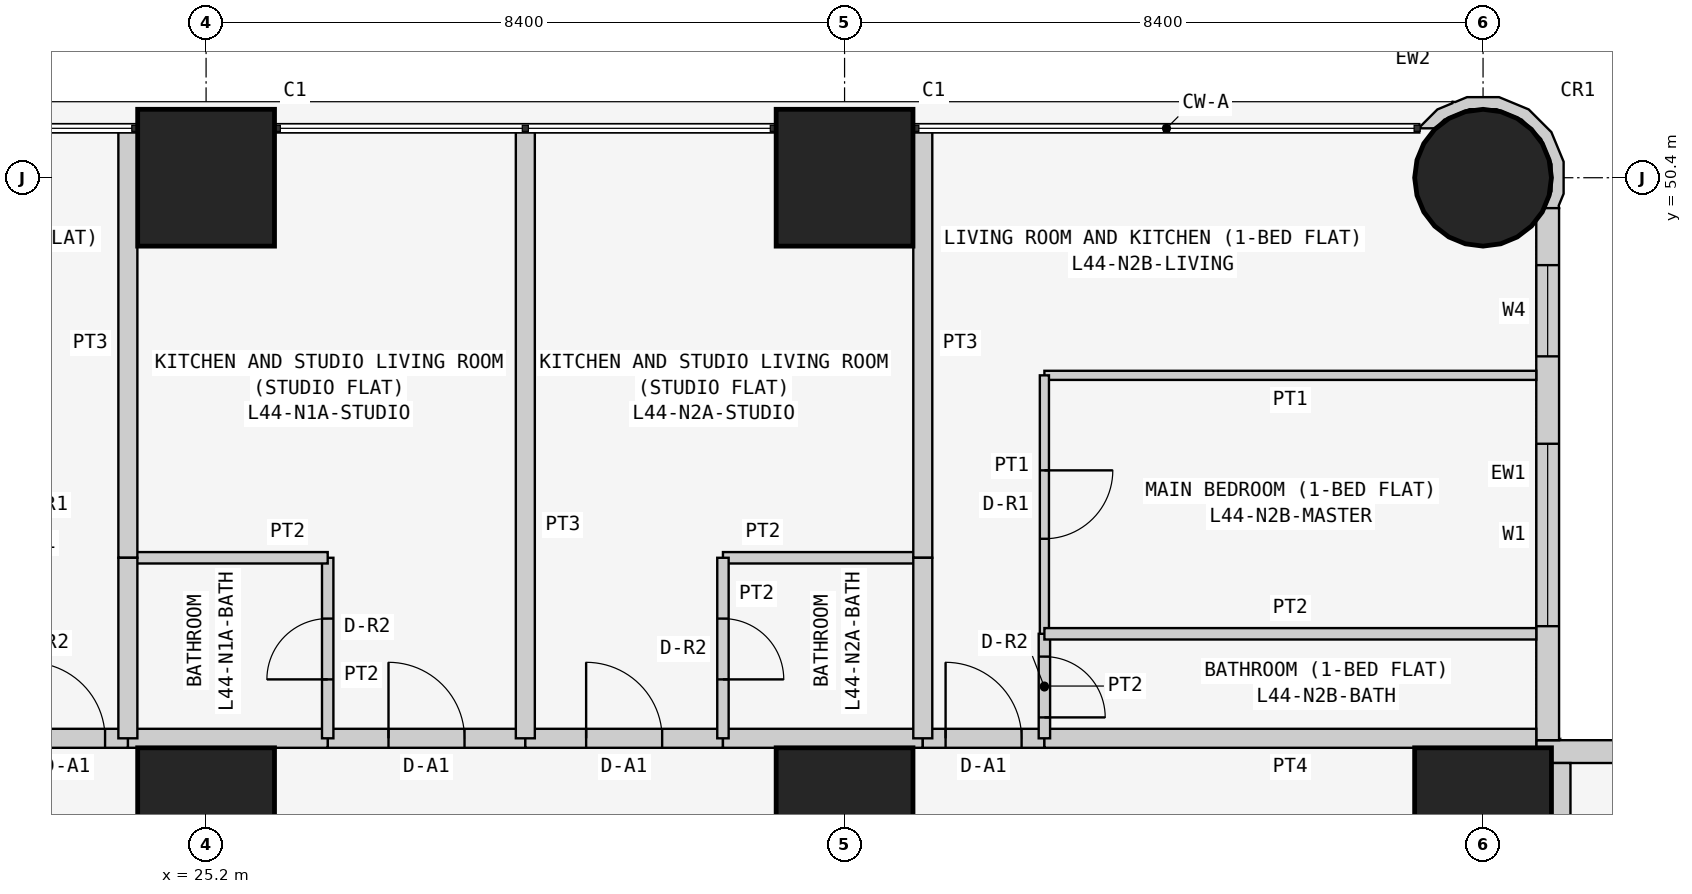
"""IFC4 building model, lengths in metres.
Left out: names, types, materials, properties, quantities, classifications, styles, units other than length and angle.
Written with IfcOpenShell. Run it as: python <this file> out.ifc"""

import sys

from ifc_helpers import new_model, si_unit, direction, frame, frame_2d, origin, origin_2d, place, context, subcontext, project, spatial, polyline, rectangle, circle, outline, extrude, element, fill, save


model = new_model("IFC4")
c1 = context("Model", 3, precision=1e-05, world=origin(), true_north=direction((0.0, 1.0)))
c2 = subcontext(c1, "Body", "Model", "MODEL_VIEW")
j1 = project(units=[si_unit("LENGTHUNIT", "METRE"), si_unit("PLANEANGLEUNIT", "RADIAN")], contexts=[c1])
p1 = place(None, origin())
s1 = spatial("IfcSite", under=j1, at=p1, CompositionType="ELEMENT")
p2 = place(p1, origin())
s2 = spatial("IfcBuilding", under=s1, at=p2, CompositionType="ELEMENT")
p3 = place(p2, frame((0.0, 0.0, 170.1)))
s3 = spatial("IfcBuildingStorey", under=s2, at=p3, CompositionType="ELEMENT", Elevation=170.1)
for number, where, z_axis, x_axis in (
    (1, (25.2, 42.0, 0.0), (0.0, 0.0, 1.0), (1.0, 0.0, 0.0)),
    (2, (25.2, 50.4, 0.0), (0.0, 0.0, 1.0), (1.0, 0.0, 0.0)),
    (3, (33.6, 42.0, 0.0), (0.0, 0.0, 1.0), (1.0, 0.0, 0.0)),
    (4, (33.6, 50.4, 0.0), (0.0, 0.0, 1.0), (1.0, 0.0, 0.0)),
    (5, (42.0, 42.0, 0.0), (0.0, 0.0, 1.0), (1.0, 0.0, 0.0)),
):
    element("IfcColumn", number, at=place(p3, frame(where, z_axis=z_axis, x_axis=x_axis)), inside=s3, PredefinedType="COLUMN", context=c2, shape_type="SweptSolid", body=[
        extrude(rectangle(XDim=1.8, YDim=1.8, at=origin_2d()), origin(), (0.0, 0.0, 1.0), 3.6),
    ])
p4 = place(p3, frame((42.0, 50.4, 0.0), z_axis=(0.0, 0.0, 1.0), x_axis=(1.0, 0.0, 0.0)))
e6 = element("IfcColumn", 6, at=p4, inside=s3, PredefinedType="COLUMN", context=c2, shape_type="SweptSolid", body=[
    extrude(circle(Radius=0.9, at=origin_2d()), origin(), (0.0, 0.0, 1.0), 3.6),
])
p5 = place(p3, frame((58.4, 42.85, 0.0), z_axis=(0.0, 0.0, 1.0), x_axis=(-1.0, 0.0, 0.0)))
e7 = element("IfcWall", 7, at=p5, inside=s3, PredefinedType="SOLIDWALL", context=c2, shape_type="SweptSolid", body=[
    extrude(rectangle(XDim=15.7, YDim=0.3, at=frame_2d((7.85, 0.0))), origin(), (0.0, 0.0, 1.0), 3.45),
])
p6 = place(p5, frame((12.4, 0.0, 0.9)))
e8 = element("IfcOpeningElement", 8, at=p6, cuts=e7, PredefinedType="OPENING", context=c2, shape_type="SweptSolid", body=[
    extrude(rectangle(XDim=1.8, YDim=1.5, at=frame_2d((0.9, 0.75))), frame((0.0, 0.16, 0.0), z_axis=(0.0, -1.0, 0.0), x_axis=(1.0, 0.0, 0.0)), (0.0, 0.0, 1.0), 0.32),
])
p7 = place(p5, frame((9.55, 0.0, 1.5)))
e9 = element("IfcOpeningElement", 9, at=p7, cuts=e7, PredefinedType="OPENING", context=c2, shape_type="SweptSolid", body=[
    extrude(rectangle(XDim=0.9, YDim=0.7, at=frame_2d((0.45, 0.35))), frame((0.0, 0.16, 0.0), z_axis=(0.0, -1.0, 0.0), x_axis=(1.0, 0.0, 0.0)), (0.0, 0.0, 1.0), 0.32),
])
p8 = place(p5, frame((5.1, 0.0, 0.9)))
e10 = element("IfcOpeningElement", 10, at=p8, cuts=e7, PredefinedType="OPENING", context=c2, shape_type="SweptSolid", body=[
    extrude(rectangle(XDim=1.8, YDim=1.5, at=frame_2d((0.9, 0.75))), frame((0.0, 0.16, 0.0), z_axis=(0.0, -1.0, 0.0), x_axis=(1.0, 0.0, 0.0)), (0.0, 0.0, 1.0), 0.32),
])
p9 = place(p5, frame((2.0, 0.0, 0.0)))
e11 = element("IfcOpeningElement", 11, at=p9, cuts=e7, PredefinedType="OPENING", context=c2, shape_type="SweptSolid", body=[
    extrude(rectangle(XDim=0.9, YDim=2.4, at=frame_2d((0.45, 1.2))), frame((0.0, 0.16, 0.0), z_axis=(0.0, -1.0, 0.0), x_axis=(1.0, 0.0, 0.0)), (0.0, 0.0, 1.0), 0.32),
])
p10 = place(p5, frame((0.7, 0.0, 0.9)))
e12 = element("IfcOpeningElement", 12, at=p10, cuts=e7, PredefinedType="OPENING", context=c2, shape_type="SweptSolid", body=[
    extrude(rectangle(XDim=1.2, YDim=1.5, at=frame_2d((0.6, 0.75))), frame((0.0, 0.16, 0.0), z_axis=(0.0, -1.0, 0.0), x_axis=(1.0, 0.0, 0.0)), (0.0, 0.0, 1.0), 0.32),
])
p11 = place(p3, frame((42.85, 43.0, 0.0), z_axis=(0.0, 0.0, 1.0), x_axis=(0.0, 1.0, 0.0)))
e13 = element("IfcWall", 13, at=p11, inside=s3, PredefinedType="SOLIDWALL", context=c2, shape_type="SweptSolid", body=[
    extrude(rectangle(XDim=7.0, YDim=0.3, at=frame_2d((3.5, 0.0))), origin(), (0.0, 0.0, 1.0), 3.45),
])
p12 = place(p11, frame((1.5, 0.0, 0.9)))
e14 = element("IfcOpeningElement", 14, at=p12, cuts=e13, PredefinedType="OPENING", context=c2, shape_type="SweptSolid", body=[
    extrude(rectangle(XDim=2.4, YDim=1.5, at=frame_2d((1.2, 0.75))), frame((0.0, 0.16, 0.0), z_axis=(0.0, -1.0, 0.0), x_axis=(1.0, 0.0, 0.0)), (0.0, 0.0, 1.0), 0.32),
])
p13 = place(p11, frame((5.05, 0.0, 0.9)))
e15 = element("IfcOpeningElement", 15, at=p13, cuts=e13, PredefinedType="OPENING", context=c2, shape_type="SweptSolid", body=[
    extrude(rectangle(XDim=1.2, YDim=1.5, at=frame_2d((0.6, 0.75))), frame((0.0, 0.16, 0.0), z_axis=(0.0, -1.0, 0.0), x_axis=(1.0, 0.0, 0.0)), (0.0, 0.0, 1.0), 0.32),
])
p14 = place(p3, frame((42.91, 50.036, 0.0), z_axis=(0.0, 0.0, 1.0), x_axis=(0.377204953059, 0.926129809145, 0.0)))
e16 = element("IfcWall", 16, at=p14, inside=s3, PredefinedType="SOLIDWALL", context=c2, shape_type="SweptSolid", body=[
    extrude(outline(polyline([(0.769, 1.728), (0.75, 1.723), (0.6, 1.875), (0.295, 2.004), (0.281, 1.998), (0.36, 1.803), (0.509, 1.741), (0.761, 1.486), (0.896, 1.154), (0.894, 0.795), (0.755, 0.465), (0.5, 0.213), (0.168, 0.078), (-0.1, 0.079), (0.001, -0.097), (0.03, -0.08), (0.198, -0.081), (0.589, 0.078), (0.889, 0.374), (1.053, 0.763), (1.055, 1.185), (0.896, 1.575), (0.778, 1.695), (0.769, 1.728)])), origin(), (0.0, 0.0, 1.0), 3.45),
])
p15 = place(p3, frame((26.8, 43.025, 0.0), z_axis=(0.0, 0.0, 1.0), x_axis=(1.0, 0.0, 0.0)))
e17 = element("IfcWall", 17, at=p15, inside=s3, PredefinedType="PARTITIONING", context=c2, shape_type="SweptSolid", body=[
    extrude(rectangle(XDim=2.6, YDim=0.25, at=frame_2d((1.3, 0.0))), origin(), (0.0, 0.0, 1.0), 3.45),
])
p16 = place(p15, frame((0.8, 0.0, 0.0)))
e18 = element("IfcOpeningElement", 18, at=p16, cuts=e17, PredefinedType="OPENING", context=c2, shape_type="SweptSolid", body=[
    extrude(rectangle(XDim=1.0, YDim=2.1, at=frame_2d((0.5, 1.05))), frame((0.0, 0.135, 0.0), z_axis=(0.0, -1.0, 0.0), x_axis=(1.0, 0.0, 0.0)), (0.0, 0.0, 1.0), 0.27),
])
p17 = place(p3, frame((24.171, 43.025, 0.0), z_axis=(0.0, 0.0, 1.0), x_axis=(1.0, 0.0, 0.0)))
e19 = element("IfcWall", 19, at=p17, inside=s3, PredefinedType="PARTITIONING", context=c2, shape_type="SweptSolid", body=[
    extrude(rectangle(XDim=2.629, YDim=0.25, at=frame_2d((1.314, 0.0))), origin(), (0.0, 0.0, 1.0), 3.45),
])
p18 = place(p3, frame((22.571, 43.025, 0.0), z_axis=(0.0, 0.0, 1.0), x_axis=(1.0, 0.0, 0.0)))
e20 = element("IfcWall", 20, at=p18, inside=s3, PredefinedType="PARTITIONING", context=c2, shape_type="SweptSolid", body=[
    extrude(rectangle(XDim=1.6, YDim=0.25, at=frame_2d((0.8, 0.0))), origin(), (0.0, 0.0, 1.0), 3.45),
])
p19 = place(p18, frame((0.3, 0.0, 0.0)))
e21 = element("IfcOpeningElement", 21, at=p19, cuts=e20, PredefinedType="OPENING", context=c2, shape_type="SweptSolid", body=[
    extrude(rectangle(XDim=1.0, YDim=2.1, at=frame_2d((0.5, 1.05))), frame((0.0, 0.135, 0.0), z_axis=(0.0, -1.0, 0.0), x_axis=(1.0, 0.0, 0.0)), (0.0, 0.0, 1.0), 0.27),
])
p20 = place(p3, frame((29.4, 43.025, 0.0), z_axis=(0.0, 0.0, 1.0), x_axis=(1.0, 0.0, 0.0)))
e22 = element("IfcWall", 22, at=p20, inside=s3, PredefinedType="PARTITIONING", context=c2, shape_type="SweptSolid", body=[
    extrude(rectangle(XDim=2.6, YDim=0.25, at=frame_2d((1.3, 0.0))), origin(), (0.0, 0.0, 1.0), 3.45),
])
p21 = place(p20, frame((0.8, 0.0, 0.0)))
e23 = element("IfcOpeningElement", 23, at=p21, cuts=e22, PredefinedType="OPENING", context=c2, shape_type="SweptSolid", body=[
    extrude(rectangle(XDim=1.0, YDim=2.1, at=frame_2d((0.5, 1.05))), frame((0.0, 0.135, 0.0), z_axis=(0.0, -1.0, 0.0), x_axis=(1.0, 0.0, 0.0)), (0.0, 0.0, 1.0), 0.27),
])
p22 = place(p3, frame((32.0, 43.025, 0.0), z_axis=(0.0, 0.0, 1.0), x_axis=(1.0, 0.0, 0.0)))
e24 = element("IfcWall", 24, at=p22, inside=s3, PredefinedType="PARTITIONING", context=c2, shape_type="SweptSolid", body=[
    extrude(rectangle(XDim=2.629, YDim=0.25, at=frame_2d((1.314, 0.0))), origin(), (0.0, 0.0, 1.0), 3.45),
])
p23 = place(p3, frame((34.629, 43.025, 0.0), z_axis=(0.0, 0.0, 1.0), x_axis=(1.0, 0.0, 0.0)))
e25 = element("IfcWall", 25, at=p23, inside=s3, PredefinedType="PARTITIONING", context=c2, shape_type="SweptSolid", body=[
    extrude(rectangle(XDim=1.6, YDim=0.25, at=frame_2d((0.8, 0.0))), origin(), (0.0, 0.0, 1.0), 3.45),
])
p24 = place(p23, frame((0.3, 0.0, 0.0)))
e26 = element("IfcOpeningElement", 26, at=p24, cuts=e25, PredefinedType="OPENING", context=c2, shape_type="SweptSolid", body=[
    extrude(rectangle(XDim=1.0, YDim=2.1, at=frame_2d((0.5, 1.05))), frame((0.0, 0.135, 0.0), z_axis=(0.0, -1.0, 0.0), x_axis=(1.0, 0.0, 0.0)), (0.0, 0.0, 1.0), 0.27),
])
p25 = place(p3, frame((36.229, 43.025, 0.0), z_axis=(0.0, 0.0, 1.0), x_axis=(1.0, 0.0, 0.0)))
e27 = element("IfcWall", 27, at=p25, inside=s3, PredefinedType="PARTITIONING", context=c2, shape_type="SweptSolid", body=[
    extrude(rectangle(XDim=6.471, YDim=0.25, at=frame_2d((3.235, 0.0))), origin(), (0.0, 0.0, 1.0), 3.45),
])
p26 = place(p3, frame((43.025, 42.7, 0.0), z_axis=(0.0, 0.0, 1.0), x_axis=(0.0, -1.0, 0.0)))
e28 = element("IfcWall", 28, at=p26, inside=s3, PredefinedType="PARTITIONING", context=c2, shape_type="SweptSolid", body=[
    extrude(rectangle(XDim=6.871, YDim=0.25, at=frame_2d((3.436, 0.0))), origin(), (0.0, 0.0, 1.0), 3.45),
])
p27 = place(p3, frame((26.8, 43.025, 0.0), z_axis=(0.0, 0.0, 1.0), x_axis=(0.0, 1.0, 0.0)))
e29 = element("IfcWall", 29, at=p27, inside=s3, PredefinedType="PARTITIONING", context=c2, shape_type="SweptSolid", body=[
    extrude(rectangle(XDim=2.375, YDim=0.15, at=frame_2d((1.188, 0.0))), origin(), (0.0, 0.0, 1.0), 3.45),
])
p28 = place(p27, frame((0.775, 0.0, 0.0)))
e30 = element("IfcOpeningElement", 30, at=p28, cuts=e29, PredefinedType="OPENING", context=c2, shape_type="SweptSolid", body=[
    extrude(rectangle(XDim=0.8, YDim=2.1, at=frame_2d((0.4, 1.05))), frame((0.0, 0.085, 0.0), z_axis=(0.0, -1.0, 0.0), x_axis=(1.0, 0.0, 0.0)), (0.0, 0.0, 1.0), 0.17),
])
p29 = place(p3, frame((26.8, 45.4, 0.0), z_axis=(0.0, 0.0, 1.0), x_axis=(-1.0, 0.0, 0.0)))
e31 = element("IfcWall", 31, at=p29, inside=s3, PredefinedType="PARTITIONING", context=c2, shape_type="SweptSolid", body=[
    extrude(rectangle(XDim=2.629, YDim=0.15, at=frame_2d((1.314, 0.0))), origin(), (0.0, 0.0, 1.0), 3.45),
])
p30 = place(p3, frame((24.171, 45.4, 0.0), z_axis=(0.0, 0.0, 1.0), x_axis=(0.0, 1.0, 0.0)))
e32 = element("IfcWall", 32, at=p30, inside=s3, PredefinedType="PARTITIONING", context=c2, shape_type="SweptSolid", body=[
    extrude(rectangle(XDim=5.65, YDim=0.25, at=frame_2d((2.825, 0.0))), origin(), (0.0, 0.0, 1.0), 3.45),
])
p31 = place(p3, frame((29.4, 51.05, 0.0), z_axis=(0.0, 0.0, 1.0), x_axis=(0.0, -1.0, 0.0)))
e33 = element("IfcWall", 33, at=p31, inside=s3, PredefinedType="PARTITIONING", context=c2, shape_type="SweptSolid", body=[
    extrude(rectangle(XDim=8.025, YDim=0.25, at=frame_2d((4.013, 0.0))), origin(), (0.0, 0.0, 1.0), 2.848),
])
p32 = place(p3, frame((24.171, 45.4, 0.0), z_axis=(0.0, 0.0, 1.0), x_axis=(0.0, -1.0, 0.0)))
e34 = element("IfcWall", 34, at=p32, inside=s3, PredefinedType="PARTITIONING", context=c2, shape_type="SweptSolid", body=[
    extrude(rectangle(XDim=2.375, YDim=0.25, at=frame_2d((1.188, 0.0))), origin(), (0.0, 0.0, 1.0), 3.45),
])
p33 = place(p3, frame((34.629, 45.4, 0.0), z_axis=(0.0, 0.0, 1.0), x_axis=(-1.0, 0.0, 0.0)))
e35 = element("IfcWall", 35, at=p33, inside=s3, PredefinedType="PARTITIONING", context=c2, shape_type="SweptSolid", body=[
    extrude(rectangle(XDim=2.629, YDim=0.15, at=frame_2d((1.314, 0.0))), origin(), (0.0, 0.0, 1.0), 3.45),
])
p34 = place(p3, frame((32.0, 45.4, 0.0), z_axis=(0.0, 0.0, 1.0), x_axis=(0.0, -1.0, 0.0)))
e36 = element("IfcWall", 36, at=p34, inside=s3, PredefinedType="PARTITIONING", context=c2, shape_type="SweptSolid", body=[
    extrude(rectangle(XDim=2.375, YDim=0.15, at=frame_2d((1.188, 0.0))), origin(), (0.0, 0.0, 1.0), 3.45),
])
p35 = place(p34, frame((0.8, 0.0, 0.0)))
e37 = element("IfcOpeningElement", 37, at=p35, cuts=e36, PredefinedType="OPENING", context=c2, shape_type="SweptSolid", body=[
    extrude(rectangle(XDim=0.8, YDim=2.1, at=frame_2d((0.4, 1.05))), frame((0.0, 0.085, 0.0), z_axis=(0.0, -1.0, 0.0), x_axis=(1.0, 0.0, 0.0)), (0.0, 0.0, 1.0), 0.17),
])
p36 = place(p3, frame((34.629, 51.05, 0.0), z_axis=(0.0, 0.0, 1.0), x_axis=(0.0, -1.0, 0.0)))
e38 = element("IfcWall", 38, at=p36, inside=s3, PredefinedType="PARTITIONING", context=c2, shape_type="SweptSolid", body=[
    extrude(rectangle(XDim=5.65, YDim=0.25, at=frame_2d((2.825, 0.0))), origin(), (0.0, 0.0, 1.0), 3.45),
])
p37 = place(p3, frame((34.629, 45.4, 0.0), z_axis=(0.0, 0.0, 1.0), x_axis=(0.0, -1.0, 0.0)))
e39 = element("IfcWall", 39, at=p37, inside=s3, PredefinedType="PARTITIONING", context=c2, shape_type="SweptSolid", body=[
    extrude(rectangle(XDim=2.375, YDim=0.25, at=frame_2d((1.188, 0.0))), origin(), (0.0, 0.0, 1.0), 3.45),
])
p38 = place(p3, frame((36.229, 44.4, 0.0), z_axis=(0.0, 0.0, 1.0), x_axis=(0.0, -1.0, 0.0)))
e40 = element("IfcWall", 40, at=p38, inside=s3, PredefinedType="PARTITIONING", context=c2, shape_type="SweptSolid", body=[
    extrude(rectangle(XDim=1.375, YDim=0.15, at=frame_2d((0.688, 0.0))), origin(), (0.0, 0.0, 1.0), 3.45),
])
p39 = place(p38, frame((0.3, 0.0, 0.0)))
e41 = element("IfcOpeningElement", 41, at=p39, cuts=e40, PredefinedType="OPENING", context=c2, shape_type="SweptSolid", body=[
    extrude(rectangle(XDim=0.8, YDim=2.1, at=frame_2d((0.4, 1.05))), frame((0.0, 0.085, 0.0), z_axis=(0.0, -1.0, 0.0), x_axis=(1.0, 0.0, 0.0)), (0.0, 0.0, 1.0), 0.17),
])
p40 = place(p3, frame((42.7, 47.8, 0.0), z_axis=(0.0, 0.0, 1.0), x_axis=(-1.0, 0.0, 0.0)))
e42 = element("IfcWall", 42, at=p40, inside=s3, PredefinedType="PARTITIONING", context=c2, shape_type="SweptSolid", body=[
    extrude(rectangle(XDim=6.471, YDim=0.12, at=frame_2d((3.235, 0.0))), origin(), (0.0, 0.0, 1.0), 3.45),
])
p41 = place(p3, frame((36.229, 47.8, 0.0), z_axis=(0.0, 0.0, 1.0), x_axis=(0.0, -1.0, 0.0)))
e43 = element("IfcWall", 43, at=p41, inside=s3, PredefinedType="PARTITIONING", context=c2, shape_type="SweptSolid", body=[
    extrude(rectangle(XDim=3.4, YDim=0.12, at=frame_2d((1.7, 0.0))), origin(), (0.0, 0.0, 1.0), 3.45),
])
p42 = place(p41, frame((1.25, 0.0, 0.0)))
e44 = element("IfcOpeningElement", 44, at=p42, cuts=e43, PredefinedType="OPENING", context=c2, shape_type="SweptSolid", body=[
    extrude(rectangle(XDim=0.9, YDim=2.1, at=frame_2d((0.45, 1.05))), frame((0.0, 0.07, 0.0), z_axis=(0.0, -1.0, 0.0), x_axis=(1.0, 0.0, 0.0)), (0.0, 0.0, 1.0), 0.14),
])
p43 = place(p3, frame((36.229, 44.4, 0.0), z_axis=(0.0, 0.0, 1.0), x_axis=(1.0, 0.0, 0.0)))
e45 = element("IfcWall", 45, at=p43, inside=s3, PredefinedType="PARTITIONING", context=c2, shape_type="SweptSolid", body=[
    extrude(rectangle(XDim=6.471, YDim=0.15, at=frame_2d((3.235, 0.0))), origin(), (0.0, 0.0, 1.0), 3.45),
])
p44 = place(p12, origin())
e46 = element("IfcWindow", 46, at=p44, inside=s3, PartitioningType="SINGLE_PANEL", PredefinedType="WINDOW", context=c2, shape_type="SweptSolid", body=[
    extrude(rectangle(XDim=2.4, YDim=1.5, at=frame_2d((1.2, 0.75))), frame((0.0, 0.03, 0.0), z_axis=(0.0, -1.0, 0.0), x_axis=(1.0, 0.0, 0.0)), (0.0, 0.0, 1.0), 0.06),
])
fill(e14, e46)
p45 = place(p13, origin())
e47 = element("IfcWindow", 47, at=p45, inside=s3, PartitioningType="SINGLE_PANEL", PredefinedType="WINDOW", context=c2, shape_type="SweptSolid", body=[
    extrude(rectangle(XDim=1.2, YDim=1.5, at=frame_2d((0.6, 0.75))), frame((0.0, 0.03, 0.0), z_axis=(0.0, -1.0, 0.0), x_axis=(1.0, 0.0, 0.0)), (0.0, 0.0, 1.0), 0.06),
])
fill(e15, e47)
p46 = place(p16, origin())
e48 = element("IfcDoor", 48, at=p46, inside=s3, OperationType="SINGLE_SWING_LEFT", PredefinedType="DOOR", context=c2, shape_type="SweptSolid", body=[
    extrude(rectangle(XDim=1.0, YDim=2.1, at=frame_2d((0.5, 1.05))), frame((0.0, 0.025, 0.0), z_axis=(0.0, -1.0, 0.0), x_axis=(1.0, 0.0, 0.0)), (0.0, 0.0, 1.0), 0.05),
])
fill(e18, e48)
p47 = place(p28, origin())
e49 = element("IfcDoor", 49, at=p47, inside=s3, OperationType="SINGLE_SWING_LEFT", PredefinedType="DOOR", context=c2, shape_type="SweptSolid", body=[
    extrude(rectangle(XDim=0.8, YDim=2.1, at=frame_2d((0.4, 1.05))), frame((0.0, 0.025, 0.0), z_axis=(0.0, -1.0, 0.0), x_axis=(1.0, 0.0, 0.0)), (0.0, 0.0, 1.0), 0.05),
])
fill(e30, e49)
p48 = place(p19, origin())
e50 = element("IfcDoor", 50, at=p48, inside=s3, OperationType="SINGLE_SWING_LEFT", PredefinedType="DOOR", context=c2, shape_type="SweptSolid", body=[
    extrude(rectangle(XDim=1.0, YDim=2.1, at=frame_2d((0.5, 1.05))), frame((0.0, 0.025, 0.0), z_axis=(0.0, -1.0, 0.0), x_axis=(1.0, 0.0, 0.0)), (0.0, 0.0, 1.0), 0.05),
])
fill(e21, e50)
p49 = place(p21, origin())
e51 = element("IfcDoor", 51, at=p49, inside=s3, OperationType="SINGLE_SWING_LEFT", PredefinedType="DOOR", context=c2, shape_type="SweptSolid", body=[
    extrude(rectangle(XDim=1.0, YDim=2.1, at=frame_2d((0.5, 1.05))), frame((0.0, 0.025, 0.0), z_axis=(0.0, -1.0, 0.0), x_axis=(1.0, 0.0, 0.0)), (0.0, 0.0, 1.0), 0.05),
])
fill(e23, e51)
p50 = place(p35, origin())
e52 = element("IfcDoor", 52, at=p50, inside=s3, OperationType="SINGLE_SWING_RIGHT", PredefinedType="DOOR", context=c2, shape_type="SweptSolid", body=[
    extrude(rectangle(XDim=0.8, YDim=2.1, at=frame_2d((0.4, 1.05))), frame((0.0, 0.025, 0.0), z_axis=(0.0, -1.0, 0.0), x_axis=(1.0, 0.0, 0.0)), (0.0, 0.0, 1.0), 0.05),
])
fill(e37, e52)
p51 = place(p24, origin())
e53 = element("IfcDoor", 53, at=p51, inside=s3, OperationType="SINGLE_SWING_LEFT", PredefinedType="DOOR", context=c2, shape_type="SweptSolid", body=[
    extrude(rectangle(XDim=1.0, YDim=2.1, at=frame_2d((0.5, 1.05))), frame((0.0, 0.025, 0.0), z_axis=(0.0, -1.0, 0.0), x_axis=(1.0, 0.0, 0.0)), (0.0, 0.0, 1.0), 0.05),
])
fill(e26, e53)
p52 = place(p39, origin())
e54 = element("IfcDoor", 54, at=p52, inside=s3, OperationType="SINGLE_SWING_RIGHT", PredefinedType="DOOR", context=c2, shape_type="SweptSolid", body=[
    extrude(rectangle(XDim=0.8, YDim=2.1, at=frame_2d((0.4, 1.05))), frame((0.0, 0.025, 0.0), z_axis=(0.0, -1.0, 0.0), x_axis=(1.0, 0.0, 0.0)), (0.0, 0.0, 1.0), 0.05),
])
fill(e41, e54)
p53 = place(p42, origin())
e55 = element("IfcDoor", 55, at=p53, inside=s3, OperationType="SINGLE_SWING_LEFT", PredefinedType="DOOR", context=c2, shape_type="SweptSolid", body=[
    extrude(rectangle(XDim=0.9, YDim=2.1, at=frame_2d((0.45, 1.05))), frame((0.0, 0.025, 0.0), z_axis=(0.0, -1.0, 0.0), x_axis=(1.0, 0.0, 0.0)), (0.0, 0.0, 1.0), 0.05),
])
fill(e44, e55)
save(model, sys.argv[1])
